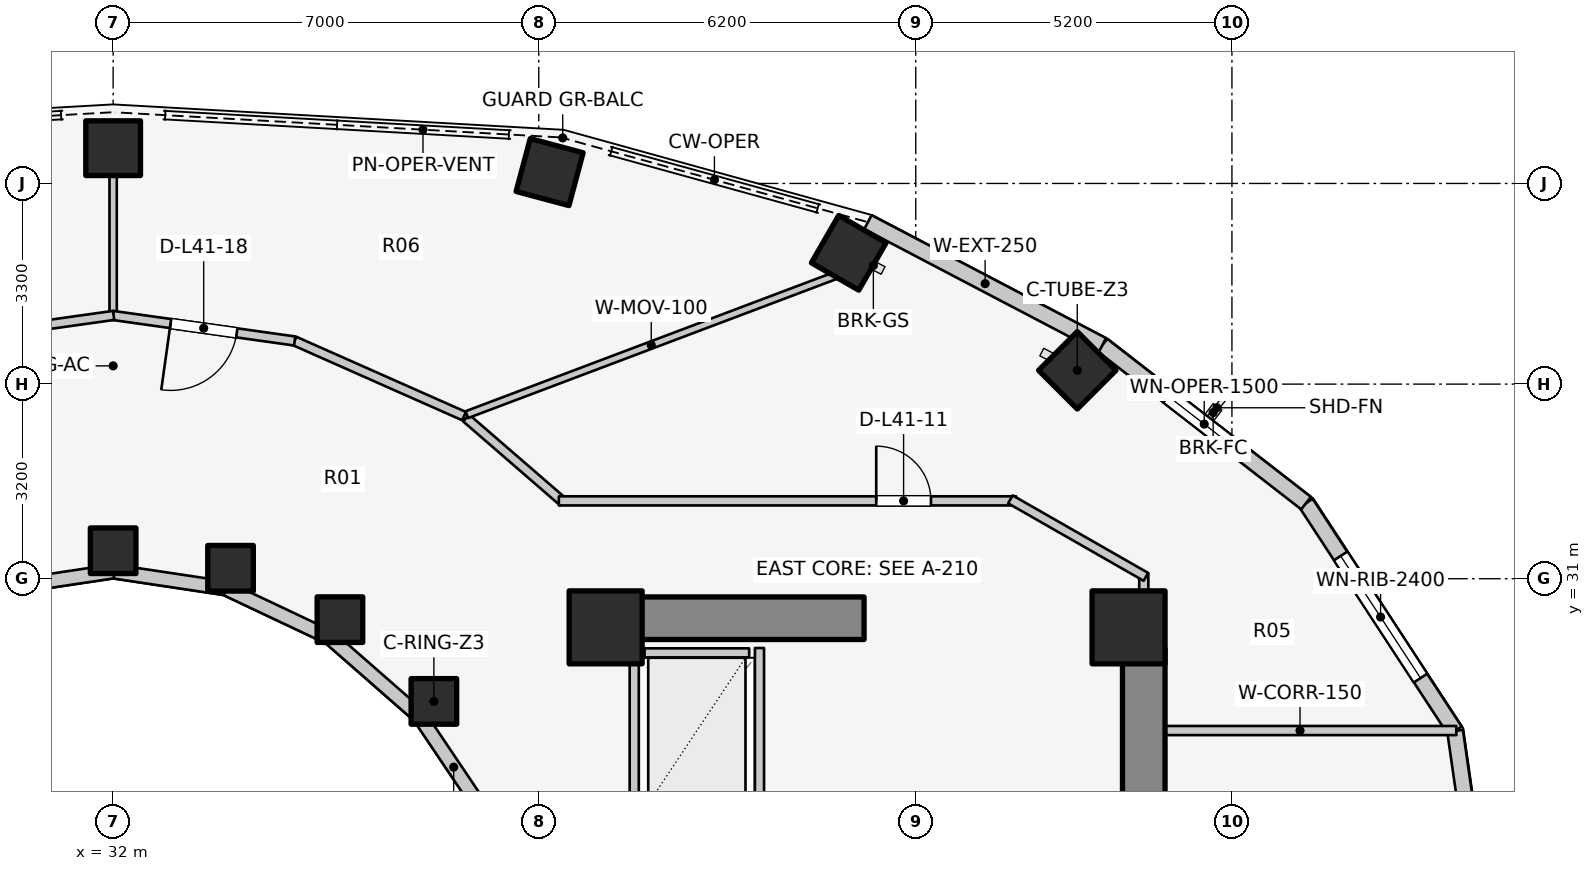
"""IFC4 building model, lengths in metres.
Left out: names, types, materials, properties, quantities, classifications, styles, units other than length and angle.
Written with IfcOpenShell. Run it as: python <this file> out.ifc"""

import sys

from ifc_helpers import new_model, si_unit, direction, frame, frame_2d, origin, origin_2d, place, context, subcontext, project, spatial, rectangle, extrude, element, fill, save


model = new_model("IFC4")
c1 = context("Model", 3, precision=1e-05, world=origin(), true_north=direction((0.0, 1.0)))
c2 = subcontext(c1, "Body", "Model", "MODEL_VIEW")
j1 = project(units=[si_unit("LENGTHUNIT", "METRE"), si_unit("PLANEANGLEUNIT", "RADIAN")], contexts=[c1])
p1 = place(None, origin())
s1 = spatial("IfcSite", under=j1, at=p1, CompositionType="ELEMENT")
p2 = place(p1, origin())
s2 = spatial("IfcBuilding", under=s1, at=p2, CompositionType="ELEMENT")
p3 = place(p2, frame((0.0, 0.0, 137.4)))
s3 = spatial("IfcBuildingStorey", under=s2, at=p3, CompositionType="ELEMENT", Elevation=137.4)
p4 = place(p3, frame((48.95, 17.05, 0.0), z_axis=(0.0, 0.0, 1.0), x_axis=(0.0, 1.0, 0.0)))
e1 = element("IfcWall", 1, at=p4, inside=s3, PredefinedType="SHEAR", context=c2, shape_type="SweptSolid", body=[
    extrude(rectangle(XDim=12.8, YDim=0.7, at=frame_2d((6.4, 0.0))), origin(), (0.0, 0.0, 1.0), 3.1),
])
p5 = place(p3, frame((39.85, 30.35, 0.0), z_axis=(0.0, 0.0, 1.0), x_axis=(1.0, 0.0, 0.0)))
e2 = element("IfcWall", 2, at=p5, inside=s3, PredefinedType="SHEAR", context=c2, shape_type="SweptSolid", body=[
    extrude(rectangle(XDim=4.5, YDim=0.7, at=frame_2d((2.25, 0.0))), origin(), (0.0, 0.0, 1.0), 3.1),
])
for number, where, z_axis, x_axis in (
    (3, (48.7, 30.2, 0.0), (0.0, 0.0, 1.0), (1.0, 0.0, 0.0)),
    (4, (40.1, 30.2, 0.0), (0.0, 0.0, 1.0), (1.0, 0.0, 0.0)),
):
    element("IfcColumn", number, at=place(p3, frame(where, z_axis=z_axis, x_axis=x_axis)), inside=s3, PredefinedType="COLUMN", context=c2, shape_type="SweptSolid", body=[
        extrude(rectangle(XDim=1.2, YDim=1.2, at=origin_2d()), origin(), (0.0, 0.0, 1.0), 3.1),
    ])
p6 = place(p3, frame((37.275, 28.982, 0.0), z_axis=(0.0, 0.0, 1.0), x_axis=(1.0, 0.0, 0.0)))
e5 = element("IfcColumn", 5, at=p6, inside=s3, PredefinedType="COLUMN", context=c2, shape_type="SweptSolid", body=[
    extrude(rectangle(XDim=0.75, YDim=0.75, at=origin_2d()), origin(), (0.0, 0.0, 1.0), 3.1),
])
p7 = place(p3, frame((47.857, 34.427, 0.0), z_axis=(0.0, 0.0, 1.0), x_axis=(0.707106781187, 0.707106781187, 0.0)))
e6 = element("IfcColumn", 6, at=p7, inside=s3, PredefinedType="COLUMN", context=c2, shape_type="SweptSolid", body=[
    extrude(rectangle(XDim=0.9, YDim=0.9, at=origin_2d()), origin(), (0.0, 0.0, 1.0), 3.1),
])
p8 = place(p3, frame((35.73, 30.327, 0.0), z_axis=(0.0, 0.0, 1.0), x_axis=(1.0, 0.0, 0.0)))
e7 = element("IfcColumn", 7, at=p8, inside=s3, PredefinedType="COLUMN", context=c2, shape_type="SweptSolid", body=[
    extrude(rectangle(XDim=0.75, YDim=0.75, at=origin_2d()), origin(), (0.0, 0.0, 1.0), 3.1),
])
p9 = place(p3, frame((44.098, 36.359, 0.0), z_axis=(0.0, 0.0, 1.0), x_axis=(0.5, 0.866025403784, 0.0)))
e8 = element("IfcColumn", 8, at=p9, inside=s3, PredefinedType="COLUMN", context=c2, shape_type="SweptSolid", body=[
    extrude(rectangle(XDim=0.9, YDim=0.9, at=origin_2d()), origin(), (0.0, 0.0, 1.0), 3.1),
])
p10 = place(p3, frame((33.931, 31.172, 0.0), z_axis=(0.0, 0.0, 1.0), x_axis=(1.0, 0.0, 0.0)))
e9 = element("IfcColumn", 9, at=p10, inside=s3, PredefinedType="COLUMN", context=c2, shape_type="SweptSolid", body=[
    extrude(rectangle(XDim=0.75, YDim=0.75, at=origin_2d()), origin(), (0.0, 0.0, 1.0), 3.1),
])
p11 = place(p3, frame((39.178, 37.687, 0.0), z_axis=(0.0, 0.0, 1.0), x_axis=(0.258819045103, 0.965925826289, 0.0)))
e10 = element("IfcColumn", 10, at=p11, inside=s3, PredefinedType="COLUMN", context=c2, shape_type="SweptSolid", body=[
    extrude(rectangle(XDim=0.9, YDim=0.9, at=origin_2d()), origin(), (0.0, 0.0, 1.0), 3.1),
])
p12 = place(p3, frame((32.0, 31.46, 0.0), z_axis=(0.0, 0.0, 1.0), x_axis=(1.0, 0.0, 0.0)))
e11 = element("IfcColumn", 11, at=p12, inside=s3, PredefinedType="COLUMN", context=c2, shape_type="SweptSolid", body=[
    extrude(rectangle(XDim=0.75, YDim=0.75, at=origin_2d()), origin(), (0.0, 0.0, 1.0), 3.1),
])
p13 = place(p3, frame((32.0, 38.08, 0.0), z_axis=(0.0, 0.0, 1.0), x_axis=(0.0, 1.0, 0.0)))
e12 = element("IfcColumn", 12, at=p13, inside=s3, PredefinedType="COLUMN", context=c2, shape_type="SweptSolid", body=[
    extrude(rectangle(XDim=0.9, YDim=0.9, at=origin_2d()), origin(), (0.0, 0.0, 1.0), 3.1),
])
p14 = place(p3, frame((38.166, 27.06, 0.0), z_axis=(0.0, 0.0, 1.0), x_axis=(-0.558197800898, 0.829707909492, 0.0)))
e13 = element("IfcWall", 13, at=p14, inside=s3, PredefinedType="STANDARD", context=c2, shape_type="SweptSolid", body=[
    extrude(rectangle(XDim=2.027, YDim=0.23, at=frame_2d((1.013, 0.0))), origin(), (0.0, 0.0, 1.0), 2.16),
])
p15 = place(p3, frame((37.035, 28.742, 0.0), z_axis=(0.0, 0.0, 1.0), x_axis=(-0.752576694707, 0.658504607869, 0.0)))
e14 = element("IfcWall", 14, at=p15, inside=s3, PredefinedType="STANDARD", context=c2, shape_type="SweptSolid", body=[
    extrude(rectangle(XDim=1.959, YDim=0.23, at=frame_2d((0.98, 0.0))), origin(), (0.0, 0.0, 1.0), 2.16),
])
p16 = place(p3, frame((35.56, 30.032, 0.0), z_axis=(0.0, 0.0, 1.0), x_axis=(-0.904179699603, 0.427152280606, 0.0)))
e15 = element("IfcWall", 15, at=p16, inside=s3, PredefinedType="STANDARD", context=c2, shape_type="SweptSolid", body=[
    extrude(rectangle(XDim=1.899, YDim=0.23, at=frame_2d((0.95, 0.0))), origin(), (0.0, 0.0, 1.0), 2.16),
])
for number, where, z_axis, x_axis in (
    (16, (33.843, 30.843, 0.0), (0.0, 0.0, 1.0), (-0.989, 0.149, 0.0)),
    (17, (32.0, 31.12, 0.0), (0.0, 0.0, 1.0), (-0.989, -0.149, 0.0)),
):
    element("IfcWall", number, at=place(p3, frame(where, z_axis=z_axis, x_axis=x_axis)), inside=s3, PredefinedType="STANDARD", context=c2, shape_type="SweptSolid", body=[
        extrude(rectangle(XDim=1.864, YDim=0.23, at=frame_2d((0.932, 0.0))), origin(), (0.0, 0.0, 1.0), 2.16),
    ])
p17 = place(p3, frame((54.86, 23.0, 0.0), z_axis=(0.0, 0.0, 1.0), x_axis=(-0.142227632286, 0.989833976288, 0.0)))
e18 = element("IfcWall", 18, at=p17, inside=s3, PredefinedType="STANDARD", context=c2, shape_type="SweptSolid", body=[
    extrude(rectangle(XDim=5.553, YDim=0.26, at=frame_2d((2.776, 0.0))), origin(), (0.0, 0.0, 1.0), 2.85),
])
p18 = place(p17, frame((2.758, 0.0, 0.75)))
e19 = element("IfcOpeningElement", 19, at=p18, cuts=e18, PredefinedType="OPENING", context=c2, shape_type="SweptSolid", body=[
    extrude(rectangle(XDim=1.2, YDim=1.5, at=frame_2d((0.6, 0.75))), frame((0.0, 0.14, 0.0), z_axis=(0.0, -1.0, 0.0), x_axis=(1.0, 0.0, 0.0)), (0.0, 0.0, 1.0), 0.28),
])
p19 = place(p3, frame((54.07, 28.497, 0.0), z_axis=(0.0, 0.0, 1.0), x_axis=(-0.547456494366, 0.836834145322, 0.0)))
e20 = element("IfcWall", 20, at=p19, inside=s3, PredefinedType="STANDARD", context=c2, shape_type="SweptSolid", body=[
    extrude(rectangle(XDim=4.477, YDim=0.26, at=frame_2d((2.239, 0.0))), origin(), (0.0, 0.0, 1.0), 2.85),
])
p20 = place(p19, frame((1.039, 0.0, 0.75)))
e21 = element("IfcOpeningElement", 21, at=p20, cuts=e20, PredefinedType="OPENING", context=c2, shape_type="SweptSolid", body=[
    extrude(rectangle(XDim=2.4, YDim=1.7, at=frame_2d((1.2, 0.85))), frame((0.0, 0.14, 0.0), z_axis=(0.0, -1.0, 0.0), x_axis=(1.0, 0.0, 0.0)), (0.0, 0.0, 1.0), 0.28),
])
p21 = place(p3, frame((51.619, 32.243, 0.0), z_axis=(0.0, 0.0, 1.0), x_axis=(-0.790185650662, 0.612867552973, 0.0)))
e22 = element("IfcWall", 22, at=p21, inside=s3, PredefinedType="STANDARD", context=c2, shape_type="SweptSolid", body=[
    extrude(rectangle(XDim=4.239, YDim=0.26, at=frame_2d((2.12, 0.0))), origin(), (0.0, 0.0, 1.0), 2.85),
])
p22 = place(p21, frame((1.37, 0.0, 0.75)))
e23 = element("IfcOpeningElement", 23, at=p22, cuts=e22, PredefinedType="OPENING", context=c2, shape_type="SweptSolid", body=[
    extrude(rectangle(XDim=1.5, YDim=1.6, at=frame_2d((0.75, 0.8))), frame((0.0, 0.14, 0.0), z_axis=(0.0, -1.0, 0.0), x_axis=(1.0, 0.0, 0.0)), (0.0, 0.0, 1.0), 0.28),
])
p23 = place(p3, frame((48.269, 34.842, 0.0), z_axis=(0.0, 0.0, 1.0), x_axis=(-0.885660265226, 0.464333818065, 0.0)))
e24 = element("IfcWall", 24, at=p23, inside=s3, PredefinedType="STANDARD", context=c2, shape_type="SweptSolid", body=[
    extrude(rectangle(XDim=4.354, YDim=0.26, at=frame_2d((2.177, 0.0))), origin(), (0.0, 0.0, 1.0), 2.85),
])
p24 = place(p3, frame((40.74, 29.78, 0.0), z_axis=(0.0, 0.0, 1.0), x_axis=(1.0, 0.0, 0.0)))
e25 = element("IfcWall", 25, at=p24, inside=s3, PredefinedType="SOLIDWALL", context=c2, shape_type="SweptSolid", body=[
    extrude(rectangle(XDim=1.72, YDim=0.15, at=frame_2d((0.86, 0.0))), origin(), (0.0, 0.0, 1.0), 2.855),
])
for number, where, z_axis, x_axis in (
    (26, (40.57, 27.14, 0.0), (0.0, 0.0, 1.0), (0.0, 1.0, 0.0)),
    (27, (42.63, 27.14, 0.0), (0.0, 0.0, 1.0), (0.0, 1.0, 0.0)),
):
    element("IfcWall", number, at=place(p3, frame(where, z_axis=z_axis, x_axis=x_axis)), inside=s3, PredefinedType="SOLIDWALL", context=c2, shape_type="SweptSolid", body=[
        extrude(rectangle(XDim=2.72, YDim=0.15, at=frame_2d((1.36, 0.0))), origin(), (0.0, 0.0, 1.0), 2.855),
    ])
p25 = place(p3, frame((48.95, 28.503, 0.0), z_axis=(0.0, 0.0, 1.0), x_axis=(1.0, 0.0, 0.0)))
e28 = element("IfcWall", 28, at=p25, inside=s3, PredefinedType="PARTITIONING", context=c2, shape_type="SweptSolid", body=[
    extrude(rectangle(XDim=5.14, YDim=0.15, at=frame_2d((2.57, 0.0))), origin(), (0.0, 0.0, 1.0), 2.855),
])
p26 = place(p3, frame((48.95, 29.8, 0.0), z_axis=(0.0, 0.0, 1.0), x_axis=(0.0, 1.0, 0.0)))
e29 = element("IfcWall", 29, at=p26, inside=s3, PredefinedType="PARTITIONING", context=c2, shape_type="SweptSolid", body=[
    extrude(rectangle(XDim=1.29, YDim=0.15, at=frame_2d((0.645, 0.0))), origin(), (0.0, 0.0, 1.0), 2.855),
])
p27 = place(p3, frame((37.807, 33.642, 0.0), z_axis=(0.0, 0.0, 1.0), x_axis=(0.756055312247, -0.654507727092, 0.0)))
e30 = element("IfcWall", 30, at=p27, inside=s3, PredefinedType="PARTITIONING", context=c2, shape_type="SweptSolid", body=[
    extrude(rectangle(XDim=2.111, YDim=0.15, at=frame_2d((1.055, 0.0))), origin(), (0.0, 0.0, 1.0), 2.299),
])
p28 = place(p3, frame((39.33, 32.28, 0.0), z_axis=(0.0, 0.0, 1.0), x_axis=(1.0, 0.0, 0.0)))
e31 = element("IfcWall", 31, at=p28, inside=s3, PredefinedType="PARTITIONING", context=c2, shape_type="SweptSolid", body=[
    extrude(rectangle(XDim=7.52, YDim=0.15, at=frame_2d((3.76, 0.0))), origin(), (0.0, 0.0, 1.0), 2.299),
])
p29 = place(p28, frame((5.22, 0.0, 0.0)))
e32 = element("IfcOpeningElement", 32, at=p29, cuts=e31, PredefinedType="OPENING", context=c2, shape_type="SweptSolid", body=[
    extrude(rectangle(XDim=0.9, YDim=2.1, at=frame_2d((0.45, 1.05))), frame((0.0, 0.085, 0.0), z_axis=(0.0, -1.0, 0.0), x_axis=(1.0, 0.0, 0.0)), (0.0, 0.0, 1.0), 0.17),
])
p30 = place(p3, frame((46.757, 32.305, 0.0), z_axis=(0.0, 0.0, 1.0), x_axis=(0.867991349648, -0.496579315857, 0.0)))
e33 = element("IfcWall", 33, at=p30, inside=s3, PredefinedType="PARTITIONING", context=c2, shape_type="SweptSolid", body=[
    extrude(rectangle(XDim=2.567, YDim=0.15, at=frame_2d((1.283, 0.0))), origin(), (0.0, 0.0, 1.0), 2.22),
])
p31 = place(p3, frame((37.816, 33.698, 0.0), z_axis=(0.0, 0.0, 1.0), x_axis=(0.935601484289, 0.353057874288, 0.0)))
e34 = element("IfcWall", 34, at=p31, inside=s3, PredefinedType="MOVABLE", context=c2, shape_type="SweptSolid", body=[
    extrude(rectangle(XDim=6.484, YDim=0.12, at=frame_2d((3.242, 0.0))), origin(), (0.0, 0.0, 1.0), 2.299),
])
p32 = place(p3, frame((32.0, 35.385, 0.0), z_axis=(0.0, 0.0, 1.0), x_axis=(0.0, 1.0, 0.0)))
e35 = element("IfcWall", 35, at=p32, inside=s3, PredefinedType="MOVABLE", context=c2, shape_type="SweptSolid", body=[
    extrude(rectangle(XDim=2.265, YDim=0.12, at=frame_2d((1.132, 0.0))), origin(), (0.0, 0.0, 1.0), 2.299),
])
p33 = place(p3, frame((37.772, 33.674, 0.0), z_axis=(0.0, 0.0, 1.0), x_axis=(-0.914216890927, 0.405225216815, 0.0)))
e36 = element("IfcWall", 36, at=p33, inside=s3, PredefinedType="PARTITIONING", context=c2, shape_type="SweptSolid", body=[
    extrude(rectangle(XDim=3.052, YDim=0.15, at=frame_2d((1.526, 0.0))), origin(), (0.0, 0.0, 1.0), 2.299),
])
p34 = place(p3, frame((34.986, 34.909, 0.0), z_axis=(0.0, 0.0, 1.0), x_axis=(-0.990263536759, 0.139205343882, 0.0)))
e37 = element("IfcWall", 37, at=p34, inside=s3, PredefinedType="PARTITIONING", context=c2, shape_type="SweptSolid", body=[
    extrude(rectangle(XDim=3.024, YDim=0.15, at=frame_2d((1.512, 0.0))), origin(), (0.0, 0.0, 1.0), 2.299),
])
p35 = place(p34, frame((0.962, 0.0, 0.0)))
e38 = element("IfcOpeningElement", 38, at=p35, cuts=e37, PredefinedType="OPENING", context=c2, shape_type="SweptSolid", body=[
    extrude(rectangle(XDim=1.1, YDim=2.1, at=frame_2d((0.55, 1.05))), frame((0.0, 0.085, 0.0), z_axis=(0.0, -1.0, 0.0), x_axis=(1.0, 0.0, 0.0)), (0.0, 0.0, 1.0), 0.17),
])
p36 = place(p3, frame((32.008, 35.33, 0.0), z_axis=(0.0, 0.0, 1.0), x_axis=(-0.990263536759, -0.139205343882, 0.0)))
e39 = element("IfcWall", 39, at=p36, inside=s3, PredefinedType="PARTITIONING", context=c2, shape_type="SweptSolid", body=[
    extrude(rectangle(XDim=3.024, YDim=0.15, at=frame_2d((1.512, 0.0))), origin(), (0.0, 0.0, 1.0), 2.299),
])
p37 = place(p20, origin())
e40 = element("IfcWindow", 40, at=p37, inside=s3, PartitioningType="SINGLE_PANEL", PredefinedType="WINDOW", context=c2, shape_type="SweptSolid", body=[
    extrude(rectangle(XDim=2.4, YDim=1.7, at=frame_2d((1.2, 0.85))), frame((0.0, 0.03, 0.0), z_axis=(0.0, -1.0, 0.0), x_axis=(1.0, 0.0, 0.0)), (0.0, 0.0, 1.0), 0.06),
])
fill(e21, e40)
p38 = place(p22, origin())
e41 = element("IfcWindow", 41, at=p38, inside=s3, PartitioningType="SINGLE_PANEL", PredefinedType="WINDOW", context=c2, shape_type="SweptSolid", body=[
    extrude(rectangle(XDim=1.5, YDim=1.6, at=frame_2d((0.75, 0.8))), frame((0.0, 0.03, 0.0), z_axis=(0.0, -1.0, 0.0), x_axis=(1.0, 0.0, 0.0)), (0.0, 0.0, 1.0), 0.06),
])
fill(e23, e41)
p39 = place(p29, origin())
e42 = element("IfcDoor", 42, at=p39, inside=s3, OperationType="SINGLE_SWING_LEFT", PredefinedType="DOOR", context=c2, shape_type="SweptSolid", body=[
    extrude(rectangle(XDim=0.9, YDim=2.1, at=frame_2d((0.45, 1.05))), frame((0.0, 0.025, 0.0), z_axis=(0.0, -1.0, 0.0), x_axis=(1.0, 0.0, 0.0)), (0.0, 0.0, 1.0), 0.05),
])
fill(e32, e42)
p40 = place(p35, origin())
e43 = element("IfcDoor", 43, at=p40, inside=s3, OperationType="SINGLE_SWING_RIGHT", PredefinedType="DOOR", context=c2, shape_type="SweptSolid", body=[
    extrude(rectangle(XDim=1.1, YDim=2.1, at=frame_2d((0.55, 1.05))), frame((0.0, 0.025, 0.0), z_axis=(0.0, -1.0, 0.0), x_axis=(1.0, 0.0, 0.0)), (0.0, 0.0, 1.0), 0.05),
])
fill(e38, e43)
save(model, sys.argv[1])
